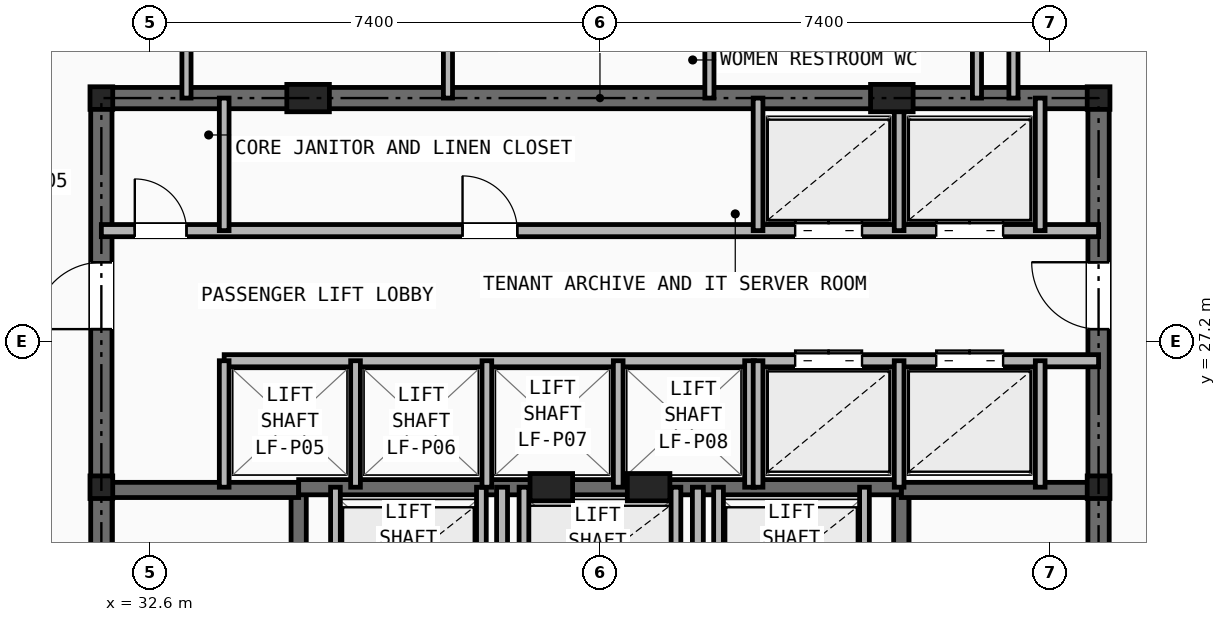
"""IFC4 building model, lengths in metres.
Left out: names, types, materials, properties, quantities, classifications, styles, units other than length and angle.
Written with IfcOpenShell. Run it as: python <this file> out.ifc"""

import sys

from ifc_helpers import new_model, si_unit, direction, frame, frame_2d, origin, origin_2d, place, context, subcontext, project, spatial, rectangle, i_section, extrude, element, fill, save


model = new_model("IFC4")
c1 = context("Model", 3, precision=1e-05, world=origin(), true_north=direction((0.0, 1.0)))
c2 = subcontext(c1, "Body", "Model", "MODEL_VIEW")
j1 = project(units=[si_unit("LENGTHUNIT", "METRE"), si_unit("PLANEANGLEUNIT", "RADIAN")], contexts=[c1])
p1 = place(None, origin())
s1 = spatial("IfcSite", under=j1, at=p1, CompositionType="ELEMENT")
p2 = place(p1, origin())
s2 = spatial("IfcBuilding", under=s1, at=p2, CompositionType="ELEMENT")
p3 = place(p2, frame((0.0, 0.0, 200.7)))
s3 = spatial("IfcBuildingStorey", under=s2, at=p3, CompositionType="ELEMENT", Elevation=200.7)
for number, where, z_axis, x_axis in (
    (1, (31.8, 24.8, 0.0), (0.0, 0.0, 1.0), (1.0, 0.0, 0.0)),
    (2, (48.2, 24.8, 0.0), (0.0, 0.0, 1.0), (1.0, 0.0, 0.0)),
    (3, (31.8, 31.2, 0.0), (0.0, 0.0, 1.0), (1.0, 0.0, 0.0)),
    (4, (48.2, 31.2, 0.0), (0.0, 0.0, 1.0), (1.0, 0.0, 0.0)),
):
    element("IfcColumn", number, at=place(p3, frame(where, z_axis=z_axis, x_axis=x_axis)), inside=s3, PredefinedType="COLUMN", context=c2, shape_type="SweptSolid", body=[
        extrude(i_section(OverallWidth=0.374, OverallDepth=0.372, WebThickness=0.016, FlangeThickness=0.026, at=origin_2d()), origin(), (0.0, 0.0, 1.0), 4.2),
    ])
for number, where, z_axis, x_axis in (
    (5, (35.2, 31.2, 0.0), (0.0, 0.0, 1.0), (1.0, 0.0, 0.0)),
    (6, (44.8, 31.2, 0.0), (0.0, 0.0, 1.0), (1.0, 0.0, 0.0)),
    (7, (39.2, 24.8, 0.0), (0.0, 0.0, 1.0), (1.0, 0.0, 0.0)),
    (8, (40.8, 24.8, 0.0), (0.0, 0.0, 1.0), (1.0, 0.0, 0.0)),
):
    element("IfcColumn", number, at=place(p3, frame(where, z_axis=z_axis, x_axis=x_axis)), inside=s3, PredefinedType="PILASTER", context=c2, shape_type="SweptSolid", body=[
        extrude(rectangle(XDim=0.7, YDim=0.45, at=origin_2d()), origin(), (0.0, 0.0, 1.0), 4.2),
    ])
p4 = place(p3, frame((31.8, 31.2, 0.0), z_axis=(0.0, 0.0, 1.0), x_axis=(1.0, 0.0, 0.0)))
e9 = element("IfcWall", 9, at=p4, inside=s3, PredefinedType="SHEAR", context=c2, shape_type="SweptSolid", body=[
    extrude(rectangle(XDim=16.4, YDim=0.35, at=frame_2d((8.2, 0.0))), origin(), (0.0, 0.0, 1.0), 3.95),
])
p5 = place(p3, frame((31.8, 16.4, 0.0), z_axis=(0.0, 0.0, 1.0), x_axis=(0.0, 1.0, 0.0)))
e10 = element("IfcWall", 10, at=p5, inside=s3, PredefinedType="SHEAR", context=c2, shape_type="SweptSolid", body=[
    extrude(rectangle(XDim=14.8, YDim=0.35, at=frame_2d((7.4, 0.0))), origin(), (0.0, 0.0, 1.0), 3.95),
])
p6 = place(p5, frame((11.0, 0.0, 0.0)))
e11 = element("IfcOpeningElement", 11, at=p6, cuts=e10, PredefinedType="OPENING", context=c2, shape_type="SweptSolid", body=[
    extrude(rectangle(XDim=1.1, YDim=2.15, at=frame_2d((0.55, 1.075))), frame((0.0, 0.185, 0.0), z_axis=(0.0, -1.0, 0.0), x_axis=(1.0, 0.0, 0.0)), (0.0, 0.0, 1.0), 0.37),
])
p7 = place(p3, frame((48.2, 16.4, 0.0), z_axis=(0.0, 0.0, 1.0), x_axis=(0.0, 1.0, 0.0)))
e12 = element("IfcWall", 12, at=p7, inside=s3, PredefinedType="SHEAR", context=c2, shape_type="SweptSolid", body=[
    extrude(rectangle(XDim=14.8, YDim=0.35, at=frame_2d((7.4, 0.0))), origin(), (0.0, 0.0, 1.0), 3.95),
])
p8 = place(p7, frame((11.0, 0.0, 0.0)))
e13 = element("IfcOpeningElement", 13, at=p8, cuts=e12, PredefinedType="OPENING", context=c2, shape_type="SweptSolid", body=[
    extrude(rectangle(XDim=1.1, YDim=2.15, at=frame_2d((0.55, 1.075))), frame((0.0, 0.185, 0.0), z_axis=(0.0, -1.0, 0.0), x_axis=(1.0, 0.0, 0.0)), (0.0, 0.0, 1.0), 0.37),
])
p9 = place(p3, frame((35.045, 16.4, 0.0), z_axis=(0.0, 0.0, 1.0), x_axis=(0.0, 1.0, 0.0)))
e14 = element("IfcWall", 14, at=p9, inside=s3, PredefinedType="SHEAR", context=c2, shape_type="SweptSolid", body=[
    extrude(rectangle(XDim=8.4, YDim=0.25, at=frame_2d((4.2, 0.0))), origin(), (0.0, 0.0, 1.0), 3.95),
])
p10 = place(p9, frame((0.45, 0.0, 0.0)))
e15 = element("IfcOpeningElement", 15, at=p10, cuts=e14, PredefinedType="OPENING", context=c2, shape_type="SweptSolid", body=[
    extrude(rectangle(XDim=0.95, YDim=2.1, at=frame_2d((0.475, 1.05))), frame((0.0, 0.135, 0.0), z_axis=(0.0, -1.0, 0.0), x_axis=(1.0, 0.0, 0.0)), (0.0, 0.0, 1.0), 0.27),
])
p11 = place(p3, frame((31.8, 24.755, 0.0), z_axis=(0.0, 0.0, 1.0), x_axis=(1.0, 0.0, 0.0)))
e16 = element("IfcWall", 16, at=p11, inside=s3, PredefinedType="SHEAR", context=c2, shape_type="SweptSolid", body=[
    extrude(rectangle(XDim=3.245, YDim=0.25, at=frame_2d((1.623, 0.0))), origin(), (0.0, 0.0, 1.0), 3.95),
])
p12 = place(p3, frame((44.955, 16.4, 0.0), z_axis=(0.0, 0.0, 1.0), x_axis=(0.0, 1.0, 0.0)))
e17 = element("IfcWall", 17, at=p12, inside=s3, PredefinedType="SHEAR", context=c2, shape_type="SweptSolid", body=[
    extrude(rectangle(XDim=8.4, YDim=0.25, at=frame_2d((4.2, 0.0))), origin(), (0.0, 0.0, 1.0), 3.95),
])
p13 = place(p12, frame((0.45, 0.0, 0.0)))
e18 = element("IfcOpeningElement", 18, at=p13, cuts=e17, PredefinedType="OPENING", context=c2, shape_type="SweptSolid", body=[
    extrude(rectangle(XDim=0.95, YDim=2.1, at=frame_2d((0.475, 1.05))), frame((0.0, 0.135, 0.0), z_axis=(0.0, -1.0, 0.0), x_axis=(1.0, 0.0, 0.0)), (0.0, 0.0, 1.0), 0.27),
])
p14 = place(p3, frame((44.955, 24.755, 0.0), z_axis=(0.0, 0.0, 1.0), x_axis=(1.0, 0.0, 0.0)))
e19 = element("IfcWall", 19, at=p14, inside=s3, PredefinedType="SHEAR", context=c2, shape_type="SweptSolid", body=[
    extrude(rectangle(XDim=3.245, YDim=0.25, at=frame_2d((1.623, 0.0))), origin(), (0.0, 0.0, 1.0), 3.95),
])
p15 = place(p3, frame((35.045, 24.8, 0.0), z_axis=(0.0, 0.0, 1.0), x_axis=(1.0, 0.0, 0.0)))
e20 = element("IfcWall", 20, at=p15, inside=s3, PredefinedType="SHEAR", context=c2, shape_type="SweptSolid", body=[
    extrude(rectangle(XDim=9.91, YDim=0.25, at=frame_2d((4.955, 0.0))), origin(), (0.0, 0.0, 1.0), 3.95),
])
p16 = place(p3, frame((38.39, 16.4, 0.0), z_axis=(0.0, 0.0, 1.0), x_axis=(0.0, 1.0, 0.0)))
e21 = element("IfcWall", 21, at=p16, inside=s3, PredefinedType="PARTITIONING", context=c2, shape_type="SweptSolid", body=[
    extrude(rectangle(XDim=8.4, YDim=0.18, at=frame_2d((4.2, 0.0))), origin(), (0.0, 0.0, 1.0), 3.405),
])
p17 = place(p16, frame((3.8, 0.0, 0.0)))
e22 = element("IfcOpeningElement", 22, at=p17, cuts=e21, PredefinedType="OPENING", context=c2, shape_type="SweptSolid", body=[
    extrude(rectangle(XDim=0.95, YDim=2.1, at=frame_2d((0.475, 1.05))), frame((0.0, 0.1, 0.0), z_axis=(0.0, -1.0, 0.0), x_axis=(1.0, 0.0, 0.0)), (0.0, 0.0, 1.0), 0.2),
])
p18 = place(p3, frame((41.61, 16.4, 0.0), z_axis=(0.0, 0.0, 1.0), x_axis=(0.0, 1.0, 0.0)))
e23 = element("IfcWall", 23, at=p18, inside=s3, PredefinedType="PARTITIONING", context=c2, shape_type="SweptSolid", body=[
    extrude(rectangle(XDim=8.4, YDim=0.18, at=frame_2d((4.2, 0.0))), origin(), (0.0, 0.0, 1.0), 3.405),
])
for number, where, z_axis, x_axis in (
    (24, (35.65, 22.48, 0.0), (0.0, 0.0, 1.0), (0.0, 1.0, 0.0)),
    (25, (38.05, 22.48, 0.0), (0.0, 0.0, 1.0), (0.0, 1.0, 0.0)),
    (26, (41.95, 22.48, 0.0), (0.0, 0.0, 1.0), (0.0, 1.0, 0.0)),
    (27, (44.35, 22.48, 0.0), (0.0, 0.0, 1.0), (0.0, 1.0, 0.0)),
    (28, (38.75, 22.48, 0.0), (0.0, 0.0, 1.0), (0.0, 1.0, 0.0)),
    (29, (41.25, 22.48, 0.0), (0.0, 0.0, 1.0), (0.0, 1.0, 0.0)),
):
    element("IfcWall", number, at=place(p3, frame(where, z_axis=z_axis, x_axis=x_axis)), inside=s3, PredefinedType="SOLIDWALL", context=c2, shape_type="SweptSolid", body=[
        extrude(rectangle(XDim=2.32, YDim=0.16, at=frame_2d((1.16, 0.0))), origin(), (0.0, 0.0, 1.0), 3.95),
    ])
p19 = place(p3, frame((31.8, 29.02, 0.0), z_axis=(0.0, 0.0, 1.0), x_axis=(1.0, 0.0, 0.0)))
e30 = element("IfcWall", 30, at=p19, inside=s3, PredefinedType="SOLIDWALL", context=c2, shape_type="SweptSolid", body=[
    extrude(rectangle(XDim=16.4, YDim=0.2, at=frame_2d((8.2, 0.0))), origin(), (0.0, 0.0, 1.0), 3.405),
])
p20 = place(p19, frame((0.55, 0.0, 0.0)))
e31 = element("IfcOpeningElement", 31, at=p20, cuts=e30, PredefinedType="OPENING", context=c2, shape_type="SweptSolid", body=[
    extrude(rectangle(XDim=0.85, YDim=2.05, at=frame_2d((0.425, 1.025))), frame((0.0, 0.11, 0.0), z_axis=(0.0, -1.0, 0.0), x_axis=(1.0, 0.0, 0.0)), (0.0, 0.0, 1.0), 0.22),
])
p21 = place(p19, frame((5.94, 0.0, 0.0)))
e32 = element("IfcOpeningElement", 32, at=p21, cuts=e30, PredefinedType="OPENING", context=c2, shape_type="SweptSolid", body=[
    extrude(rectangle(XDim=0.9, YDim=2.1, at=frame_2d((0.45, 1.05))), frame((0.0, 0.11, 0.0), z_axis=(0.0, -1.0, 0.0), x_axis=(1.0, 0.0, 0.0)), (0.0, 0.0, 1.0), 0.22),
])
p22 = place(p19, frame((11.41, 0.0, 0.0)))
e33 = element("IfcOpeningElement", 33, at=p22, cuts=e30, PredefinedType="OPENING", context=c2, shape_type="SweptSolid", body=[
    extrude(rectangle(XDim=1.1, YDim=2.15, at=frame_2d((0.55, 1.075))), frame((0.0, 0.11, 0.0), z_axis=(0.0, -1.0, 0.0), x_axis=(1.0, 0.0, 0.0)), (0.0, 0.0, 1.0), 0.22),
])
p23 = place(p19, frame((13.73, 0.0, 0.0)))
e34 = element("IfcOpeningElement", 34, at=p23, cuts=e30, PredefinedType="OPENING", context=c2, shape_type="SweptSolid", body=[
    extrude(rectangle(XDim=1.1, YDim=2.15, at=frame_2d((0.55, 1.075))), frame((0.0, 0.11, 0.0), z_axis=(0.0, -1.0, 0.0), x_axis=(1.0, 0.0, 0.0)), (0.0, 0.0, 1.0), 0.22),
])
p24 = place(p3, frame((33.82, 26.88, 0.0), z_axis=(0.0, 0.0, 1.0), x_axis=(1.0, 0.0, 0.0)))
e35 = element("IfcWall", 35, at=p24, inside=s3, PredefinedType="SOLIDWALL", context=c2, shape_type="SweptSolid", body=[
    extrude(rectangle(XDim=14.38, YDim=0.2, at=frame_2d((7.19, 0.0))), origin(), (0.0, 0.0, 1.0), 3.405),
])
p25 = place(p24, frame((9.39, 0.0, 0.0)))
e36 = element("IfcOpeningElement", 36, at=p25, cuts=e35, PredefinedType="OPENING", context=c2, shape_type="SweptSolid", body=[
    extrude(rectangle(XDim=1.1, YDim=2.15, at=frame_2d((0.55, 1.075))), frame((0.0, 0.11, 0.0), z_axis=(0.0, -1.0, 0.0), x_axis=(1.0, 0.0, 0.0)), (0.0, 0.0, 1.0), 0.22),
])
p26 = place(p24, frame((11.71, 0.0, 0.0)))
e37 = element("IfcOpeningElement", 37, at=p26, cuts=e35, PredefinedType="OPENING", context=c2, shape_type="SweptSolid", body=[
    extrude(rectangle(XDim=1.1, YDim=2.15, at=frame_2d((0.55, 1.075))), frame((0.0, 0.11, 0.0), z_axis=(0.0, -1.0, 0.0), x_axis=(1.0, 0.0, 0.0)), (0.0, 0.0, 1.0), 0.22),
])
p27 = place(p3, frame((33.82, 29.02, 0.0), z_axis=(0.0, 0.0, 1.0), x_axis=(0.0, 1.0, 0.0)))
e38 = element("IfcWall", 38, at=p27, inside=s3, PredefinedType="SOLIDWALL", context=c2, shape_type="SweptSolid", body=[
    extrude(rectangle(XDim=2.18, YDim=0.16, at=frame_2d((1.09, 0.0))), origin(), (0.0, 0.0, 1.0), 3.405),
])
for number, where, z_axis, x_axis in (
    (39, (33.82, 24.8, 0.0), (0.0, 0.0, 1.0), (0.0, 1.0, 0.0)),
    (40, (35.98, 24.8, 0.0), (0.0, 0.0, 1.0), (0.0, 1.0, 0.0)),
    (41, (38.14, 24.8, 0.0), (0.0, 0.0, 1.0), (0.0, 1.0, 0.0)),
    (42, (40.3, 24.8, 0.0), (0.0, 0.0, 1.0), (0.0, 1.0, 0.0)),
    (43, (42.46, 24.8, 0.0), (0.0, 0.0, 1.0), (0.0, 1.0, 0.0)),
):
    element("IfcWall", number, at=place(p3, frame(where, z_axis=z_axis, x_axis=x_axis)), inside=s3, PredefinedType="SOLIDWALL", context=c2, shape_type="SweptSolid", body=[
        extrude(rectangle(XDim=2.08, YDim=0.16, at=frame_2d((1.04, 0.0))), origin(), (0.0, 0.0, 1.0), 3.95),
    ])
for number, where, z_axis, x_axis in (
    (44, (42.6, 29.02, 0.0), (0.0, 0.0, 1.0), (0.0, 1.0, 0.0)),
    (45, (44.92, 29.02, 0.0), (0.0, 0.0, 1.0), (0.0, 1.0, 0.0)),
    (46, (47.24, 29.02, 0.0), (0.0, 0.0, 1.0), (0.0, 1.0, 0.0)),
):
    element("IfcWall", number, at=place(p3, frame(where, z_axis=z_axis, x_axis=x_axis)), inside=s3, PredefinedType="SOLIDWALL", context=c2, shape_type="SweptSolid", body=[
        extrude(rectangle(XDim=2.18, YDim=0.16, at=frame_2d((1.09, 0.0))), origin(), (0.0, 0.0, 1.0), 3.405),
    ])
for number, where, z_axis, x_axis in (
    (47, (42.6, 24.8, 0.0), (0.0, 0.0, 1.0), (0.0, 1.0, 0.0)),
    (48, (44.92, 24.8, 0.0), (0.0, 0.0, 1.0), (0.0, 1.0, 0.0)),
    (49, (47.24, 24.8, 0.0), (0.0, 0.0, 1.0), (0.0, 1.0, 0.0)),
):
    element("IfcWall", number, at=place(p3, frame(where, z_axis=z_axis, x_axis=x_axis)), inside=s3, PredefinedType="SOLIDWALL", context=c2, shape_type="SweptSolid", body=[
        extrude(rectangle(XDim=2.08, YDim=0.16, at=frame_2d((1.04, 0.0))), origin(), (0.0, 0.0, 1.0), 3.95),
    ])
for number, where, z_axis, x_axis in (
    (50, (33.2, 31.2, 0.0), (0.0, 0.0, 1.0), (0.0, 1.0, 0.0)),
    (51, (46.2, 31.2, 0.0), (0.0, 0.0, 1.0), (0.0, 1.0, 0.0)),
    (52, (37.5, 31.2, 0.0), (0.0, 0.0, 1.0), (0.0, 1.0, 0.0)),
    (53, (41.8, 31.2, 0.0), (0.0, 0.0, 1.0), (0.0, 1.0, 0.0)),
):
    element("IfcWall", number, at=place(p3, frame(where, z_axis=z_axis, x_axis=x_axis)), inside=s3, PredefinedType="PARTITIONING", context=c2, shape_type="SweptSolid", body=[
        extrude(rectangle(XDim=2.6, YDim=0.15, at=frame_2d((1.3, 0.0))), origin(), (0.0, 0.0, 1.0), 3.405),
    ])
p28 = place(p3, frame((46.8, 31.2, 0.0), z_axis=(0.0, 0.0, 1.0), x_axis=(0.0, 1.0, 0.0)))
e54 = element("IfcWall", 54, at=p28, inside=s3, PredefinedType="PARTITIONING", context=c2, shape_type="SweptSolid", body=[
    extrude(rectangle(XDim=4.5, YDim=0.15, at=frame_2d((2.25, 0.0))), origin(), (0.0, 0.0, 1.0), 3.405),
])
p29 = place(p20, origin())
e55 = element("IfcDoor", 55, at=p29, inside=s3, OperationType="SINGLE_SWING_LEFT", PredefinedType="DOOR", context=c2, shape_type="SweptSolid", body=[
    extrude(rectangle(XDim=0.85, YDim=2.05, at=frame_2d((0.425, 1.025))), frame((0.0, 0.025, 0.0), z_axis=(0.0, -1.0, 0.0), x_axis=(1.0, 0.0, 0.0)), (0.0, 0.0, 1.0), 0.05),
])
fill(e31, e55)
p30 = place(p6, origin())
e56 = element("IfcDoor", 56, at=p30, inside=s3, OperationType="SINGLE_SWING_LEFT", PredefinedType="DOOR", context=c2, shape_type="SweptSolid", body=[
    extrude(rectangle(XDim=1.1, YDim=2.15, at=frame_2d((0.55, 1.075))), frame((0.0, 0.025, 0.0), z_axis=(0.0, -1.0, 0.0), x_axis=(1.0, 0.0, 0.0)), (0.0, 0.0, 1.0), 0.05),
])
fill(e11, e56)
p31 = place(p8, origin())
e57 = element("IfcDoor", 57, at=p31, inside=s3, OperationType="SINGLE_SWING_RIGHT", PredefinedType="DOOR", context=c2, shape_type="SweptSolid", body=[
    extrude(rectangle(XDim=1.1, YDim=2.15, at=frame_2d((0.55, 1.075))), frame((0.0, 0.025, 0.0), z_axis=(0.0, -1.0, 0.0), x_axis=(1.0, 0.0, 0.0)), (0.0, 0.0, 1.0), 0.05),
])
fill(e13, e57)
p32 = place(p21, origin())
e58 = element("IfcDoor", 58, at=p32, inside=s3, OperationType="SINGLE_SWING_LEFT", PredefinedType="DOOR", context=c2, shape_type="SweptSolid", body=[
    extrude(rectangle(XDim=0.9, YDim=2.1, at=frame_2d((0.45, 1.05))), frame((0.0, 0.025, 0.0), z_axis=(0.0, -1.0, 0.0), x_axis=(1.0, 0.0, 0.0)), (0.0, 0.0, 1.0), 0.05),
])
fill(e32, e58)
p33 = place(p22, origin())
e59 = element("IfcDoor", 59, at=p33, inside=s3, OperationType="DOUBLE_DOOR_SLIDING", PredefinedType="DOOR", context=c2, shape_type="SweptSolid", body=[
    extrude(rectangle(XDim=1.1, YDim=2.15, at=frame_2d((0.55, 1.075))), frame((0.0, 0.025, 0.0), z_axis=(0.0, -1.0, 0.0), x_axis=(1.0, 0.0, 0.0)), (0.0, 0.0, 1.0), 0.05),
])
fill(e33, e59)
p34 = place(p23, origin())
e60 = element("IfcDoor", 60, at=p34, inside=s3, OperationType="DOUBLE_DOOR_SLIDING", PredefinedType="DOOR", context=c2, shape_type="SweptSolid", body=[
    extrude(rectangle(XDim=1.1, YDim=2.15, at=frame_2d((0.55, 1.075))), frame((0.0, 0.025, 0.0), z_axis=(0.0, -1.0, 0.0), x_axis=(1.0, 0.0, 0.0)), (0.0, 0.0, 1.0), 0.05),
])
fill(e34, e60)
p35 = place(p25, origin())
e61 = element("IfcDoor", 61, at=p35, inside=s3, OperationType="DOUBLE_DOOR_SLIDING", PredefinedType="DOOR", context=c2, shape_type="SweptSolid", body=[
    extrude(rectangle(XDim=1.1, YDim=2.15, at=frame_2d((0.55, 1.075))), frame((0.0, 0.025, 0.0), z_axis=(0.0, -1.0, 0.0), x_axis=(1.0, 0.0, 0.0)), (0.0, 0.0, 1.0), 0.05),
])
fill(e36, e61)
p36 = place(p26, origin())
e62 = element("IfcDoor", 62, at=p36, inside=s3, OperationType="DOUBLE_DOOR_SLIDING", PredefinedType="DOOR", context=c2, shape_type="SweptSolid", body=[
    extrude(rectangle(XDim=1.1, YDim=2.15, at=frame_2d((0.55, 1.075))), frame((0.0, 0.025, 0.0), z_axis=(0.0, -1.0, 0.0), x_axis=(1.0, 0.0, 0.0)), (0.0, 0.0, 1.0), 0.05),
])
fill(e37, e62)
save(model, sys.argv[1])
